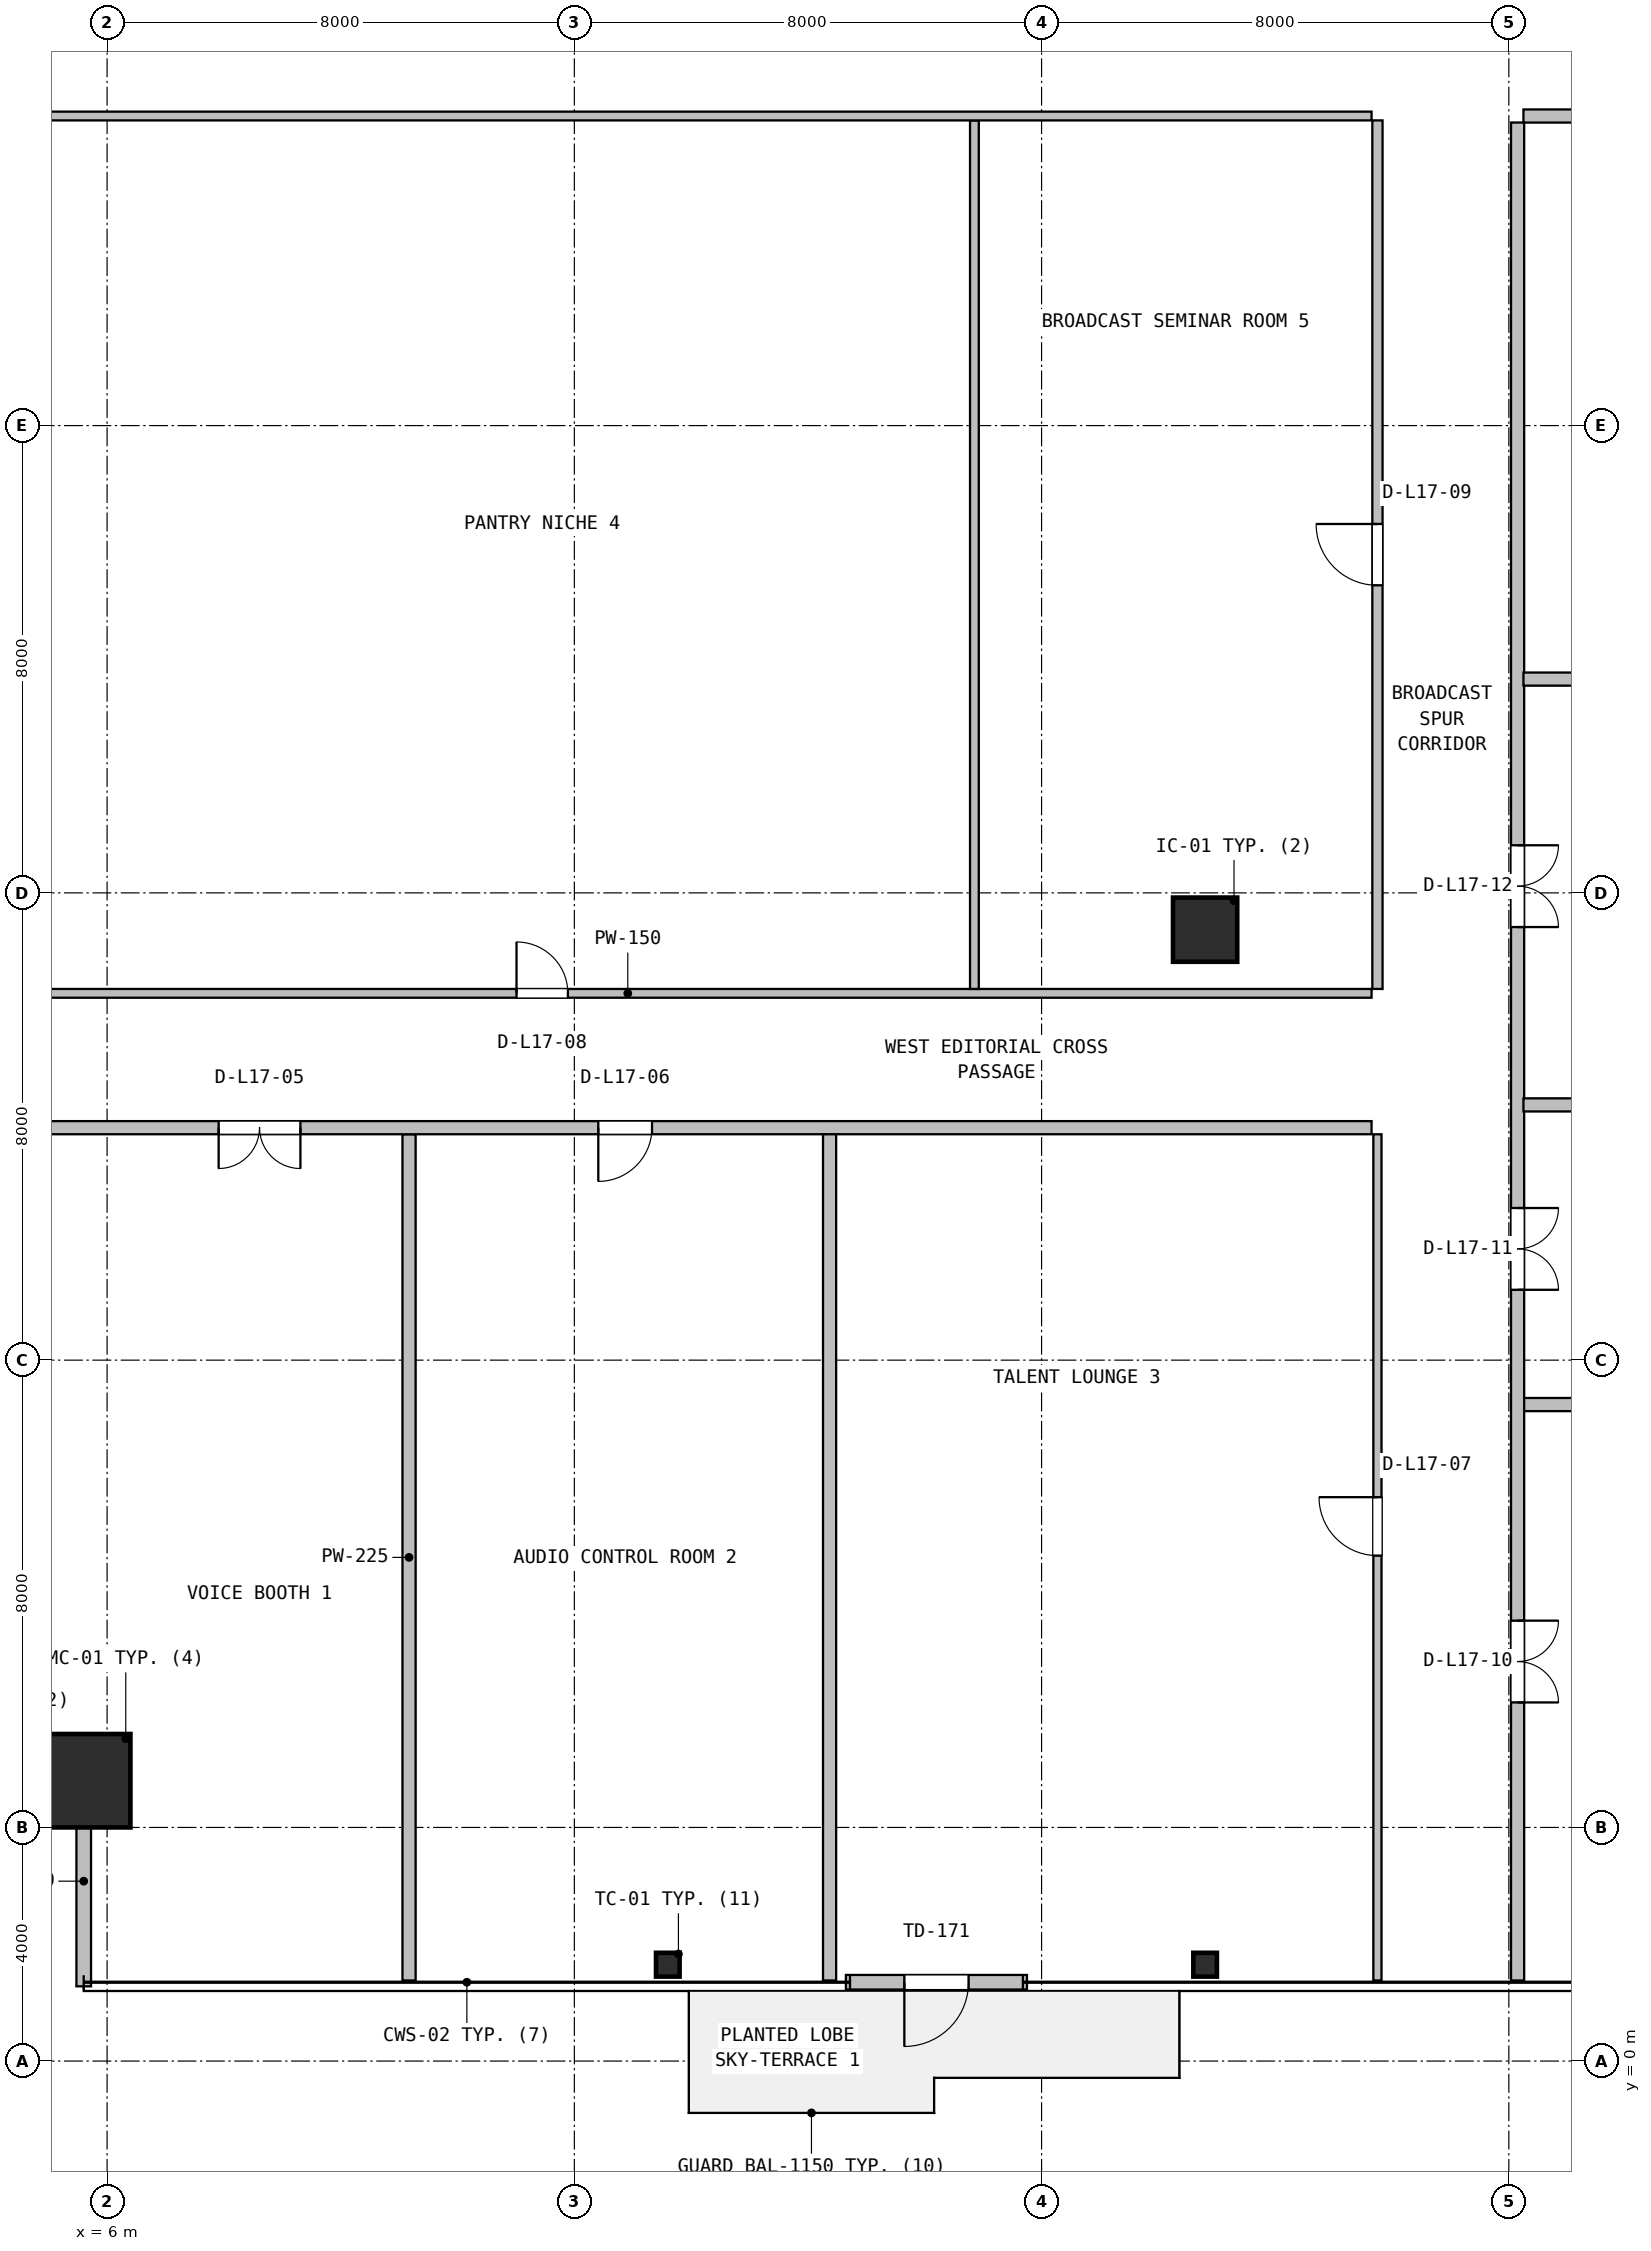
"""IFC4 building model, lengths in metres.
Left out: names, types, materials, properties, quantities, classifications, styles, units other than length and angle.
Written with IfcOpenShell. Run it as: python <this file> out.ifc"""

import sys

from ifc_helpers import new_model, si_unit, direction, frame, frame_2d, origin, origin_2d, place, context, subcontext, project, spatial, rectangle, hollow_rectangle, i_section, extrude, source, transform, mapped, element, fill, save


model = new_model("IFC4")
c1 = context("Model", 3, precision=1e-05, world=origin(), true_north=direction((0.0, 1.0)))
c2 = subcontext(c1, "Body", "Model", "MODEL_VIEW")
j1 = project(units=[si_unit("LENGTHUNIT", "METRE"), si_unit("PLANEANGLEUNIT", "RADIAN")], contexts=[c1])
p1 = place(None, origin())
s1 = spatial("IfcSite", under=j1, at=p1, CompositionType="ELEMENT")
p2 = place(p1, origin())
s2 = spatial("IfcBuilding", under=s1, at=p2, CompositionType="ELEMENT")
p3 = place(p2, frame((0.0, 0.0, 74.4)))
s3 = spatial("IfcBuildingStorey", under=s2, at=p3, CompositionType="ELEMENT", Elevation=74.4)
m1 = source(origin(), c2, "Body", "SweptSolid", [
    extrude(hollow_rectangle(XDim=1.6, YDim=1.6, WallThickness=0.06, at=origin_2d()), origin(), (0.0, 0.0, 1.0), 3.9),
])
p4 = place(p3, frame((5.6, 4.8, 0.0), z_axis=(0.0, 0.0, 1.0), x_axis=(1.0, 0.0, 0.0)))
e1 = element("IfcColumn", 1, at=p4, inside=s3, PredefinedType="COLUMN", context=c2, shape_type="MappedRepresentation", body=[
    mapped(m1, transform((0.0, 0.0, 0.0), x_axis=(1.0, 0.0, 0.0), y_axis=(0.0, 1.0, 0.0), z_axis=(0.0, 0.0, 1.0), scale=1.0)),
])
m2 = source(origin(), c2, "Body", "SweptSolid", [
    extrude(i_section(OverallWidth=0.404, OverallDepth=0.407, WebThickness=0.027, FlangeThickness=0.044, FilletRadius=0.018, at=origin_2d()), origin(), (0.0, 0.0, 1.0), 3.9),
])
for number, where, z_axis, x_axis in (
    (2, (15.6, 1.65, 0.0), (0.0, 0.0, 1.0), (1.0, 0.0, 0.0)),
    (3, (24.8, 1.65, 0.0), (0.0, 0.0, 1.0), (1.0, 0.0, 0.0)),
):
    element("IfcColumn", number, at=place(p3, frame(where, z_axis=z_axis, x_axis=x_axis)), inside=s3, PredefinedType="COLUMN", context=c2, shape_type="MappedRepresentation", body=[
        mapped(m2, transform((0.0, 0.0, 0.0), x_axis=(1.0, 0.0, 0.0), y_axis=(0.0, 1.0, 0.0), z_axis=(0.0, 0.0, 1.0), scale=1.0)),
    ])
m3 = source(origin(), c2, "Body", "SweptSolid", [
    extrude(rectangle(XDim=1.1, YDim=1.1, at=origin_2d()), origin(), (0.0, 0.0, 1.0), 3.9),
])
p5 = place(p3, frame((24.8, 19.37, 0.0), z_axis=(0.0, 0.0, 1.0), x_axis=(1.0, 0.0, 0.0)))
e4 = element("IfcColumn", 4, at=p5, inside=s3, PredefinedType="COLUMN", context=c2, shape_type="MappedRepresentation", body=[
    mapped(m3, transform((0.0, 0.0, 0.0), x_axis=(1.0, 0.0, 0.0), y_axis=(0.0, 1.0, 0.0), z_axis=(0.0, 0.0, 1.0), scale=1.0)),
])
p6 = place(p3, frame((18.65, 1.35, 0.0), z_axis=(0.0, 0.0, 1.0), x_axis=(1.0, 0.0, 0.0)))
e5 = element("IfcWall", 5, at=p6, inside=s3, PredefinedType="SOLIDWALL", context=c2, shape_type="SweptSolid", body=[
    extrude(rectangle(XDim=3.1, YDim=0.25, at=frame_2d((1.55, 0.0))), origin(), (0.0, 0.0, 1.0), 3.63),
])
p7 = place(p6, frame((1.0, 0.0, 0.0)))
e6 = element("IfcOpeningElement", 6, at=p7, cuts=e5, PredefinedType="OPENING", context=c2, shape_type="SweptSolid", body=[
    extrude(rectangle(XDim=1.1, YDim=2.15, at=frame_2d((0.55, 1.075))), frame((0.0, 0.135, 0.0), z_axis=(0.0, -1.0, 0.0), x_axis=(1.0, 0.0, 0.0)), (0.0, 0.0, 1.0), 0.27),
])
p8 = place(p3, frame((5.6, 1.28, 0.0), z_axis=(0.0, 0.0, 1.0), x_axis=(0.0, 1.0, 0.0)))
e7 = element("IfcWall", 7, at=p8, inside=s3, PredefinedType="SOLIDWALL", context=c2, shape_type="SweptSolid", body=[
    extrude(rectangle(XDim=3.6, YDim=0.25, at=frame_2d((1.8, 0.0))), origin(), (0.0, 0.0, 1.0), 3.208),
])
p9 = place(p3, frame((11.17, 1.38, 0.0), z_axis=(0.0, 0.0, 1.0), x_axis=(0.0, 1.0, 0.0)))
e8 = element("IfcWall", 8, at=p9, inside=s3, PredefinedType="PARTITIONING", context=c2, shape_type="SweptSolid", body=[
    extrude(rectangle(XDim=14.487, YDim=0.225, at=frame_2d((7.244, 0.0))), origin(), (0.0, 0.0, 1.0), 3.208),
])
p10 = place(p3, frame((2.18, 15.98, 0.0), z_axis=(0.0, 0.0, 1.0), x_axis=(1.0, 0.0, 0.0)))
e9 = element("IfcWall", 9, at=p10, inside=s3, PredefinedType="PARTITIONING", context=c2, shape_type="SweptSolid", body=[
    extrude(rectangle(XDim=25.47, YDim=0.225, at=frame_2d((12.735, 0.0))), origin(), (0.0, 0.0, 1.0), 2.852),
])
p11 = place(p10, frame((5.73, 0.0, 0.0)))
e10 = element("IfcOpeningElement", 10, at=p11, cuts=e9, PredefinedType="OPENING", context=c2, shape_type="SweptSolid", body=[
    extrude(rectangle(XDim=1.4, YDim=2.12, at=frame_2d((0.7, 1.06))), frame((0.0, 0.123, 0.0), z_axis=(0.0, -1.0, 0.0), x_axis=(1.0, 0.0, 0.0)), (0.0, 0.0, 1.0), 0.245),
])
p12 = place(p10, frame((12.23, 0.0, 0.0)))
e11 = element("IfcOpeningElement", 11, at=p12, cuts=e9, PredefinedType="OPENING", context=c2, shape_type="SweptSolid", body=[
    extrude(rectangle(XDim=0.92, YDim=2.08, at=frame_2d((0.46, 1.04))), frame((0.0, 0.123, 0.0), z_axis=(0.0, -1.0, 0.0), x_axis=(1.0, 0.0, 0.0)), (0.0, 0.0, 1.0), 0.245),
])
p13 = place(p3, frame((18.37, 1.38, 0.0), z_axis=(0.0, 0.0, 1.0), x_axis=(0.0, 1.0, 0.0)))
e12 = element("IfcWall", 12, at=p13, inside=s3, PredefinedType="PARTITIONING", context=c2, shape_type="SweptSolid", body=[
    extrude(rectangle(XDim=14.487, YDim=0.225, at=frame_2d((7.244, 0.0))), origin(), (0.0, 0.0, 1.0), 3.208),
])
p14 = place(p3, frame((27.75, 1.38, 0.0), z_axis=(0.0, 0.0, 1.0), x_axis=(0.0, 1.0, 0.0)))
e13 = element("IfcWall", 13, at=p14, inside=s3, PredefinedType="PARTITIONING", context=c2, shape_type="SweptSolid", body=[
    extrude(rectangle(XDim=14.487, YDim=0.14, at=frame_2d((7.244, 0.0))), origin(), (0.0, 0.0, 1.0), 3.208),
])
p15 = place(p14, frame((7.274, 0.0, 0.0)))
e14 = element("IfcOpeningElement", 14, at=p15, cuts=e13, PredefinedType="OPENING", context=c2, shape_type="SweptSolid", body=[
    extrude(rectangle(XDim=1.0, YDim=2.1, at=frame_2d((0.5, 1.05))), frame((0.0, 0.08, 0.0), z_axis=(0.0, -1.0, 0.0), x_axis=(1.0, 0.0, 0.0)), (0.0, 0.0, 1.0), 0.16),
])
p16 = place(p3, frame((2.18, 18.28, 0.0), z_axis=(0.0, 0.0, 1.0), x_axis=(1.0, 0.0, 0.0)))
e15 = element("IfcWall", 15, at=p16, inside=s3, PredefinedType="PARTITIONING", context=c2, shape_type="SweptSolid", body=[
    extrude(rectangle(XDim=25.47, YDim=0.15, at=frame_2d((12.735, 0.0))), origin(), (0.0, 0.0, 1.0), 2.852),
])
p17 = place(p16, frame((10.83, 0.0, 0.0)))
e16 = element("IfcOpeningElement", 16, at=p17, cuts=e15, PredefinedType="OPENING", context=c2, shape_type="SweptSolid", body=[
    extrude(rectangle(XDim=0.88, YDim=2.06, at=frame_2d((0.44, 1.03))), frame((0.0, 0.085, 0.0), z_axis=(0.0, -1.0, 0.0), x_axis=(1.0, 0.0, 0.0)), (0.0, 0.0, 1.0), 0.17),
])
p18 = place(p3, frame((20.85, 18.355, 0.0), z_axis=(0.0, 0.0, 1.0), x_axis=(0.0, 1.0, 0.0)))
e17 = element("IfcWall", 17, at=p18, inside=s3, PredefinedType="PARTITIONING", context=c2, shape_type="SweptSolid", body=[
    extrude(rectangle(XDim=14.87, YDim=0.15, at=frame_2d((7.435, 0.0))), origin(), (0.0, 0.0, 1.0), 3.322),
])
p19 = place(p3, frame((2.18, 33.3, 0.0), z_axis=(0.0, 0.0, 1.0), x_axis=(1.0, 0.0, 0.0)))
e18 = element("IfcWall", 18, at=p19, inside=s3, PredefinedType="PARTITIONING", context=c2, shape_type="SweptSolid", body=[
    extrude(rectangle(XDim=25.47, YDim=0.15, at=frame_2d((12.735, 0.0))), origin(), (0.0, 0.0, 1.0), 2.852),
])
p20 = place(p3, frame((27.75, 18.355, 0.0), z_axis=(0.0, 0.0, 1.0), x_axis=(0.0, 1.0, 0.0)))
e19 = element("IfcWall", 19, at=p20, inside=s3, PredefinedType="PARTITIONING", context=c2, shape_type="SweptSolid", body=[
    extrude(rectangle(XDim=14.87, YDim=0.175, at=frame_2d((7.435, 0.0))), origin(), (0.0, 0.0, 1.0), 2.852),
])
p21 = place(p20, frame((6.91, 0.0, 0.0)))
e20 = element("IfcOpeningElement", 20, at=p21, cuts=e19, PredefinedType="OPENING", context=c2, shape_type="SweptSolid", body=[
    extrude(rectangle(XDim=1.05, YDim=2.1, at=frame_2d((0.525, 1.05))), frame((0.0, 0.098, 0.0), z_axis=(0.0, -1.0, 0.0), x_axis=(1.0, 0.0, 0.0)), (0.0, 0.0, 1.0), 0.195),
])
p22 = place(p3, frame((30.25, 11.24, 0.0), z_axis=(0.0, 0.0, 1.0), x_axis=(1.0, 0.0, 0.0)))
e21 = element("IfcWall", 21, at=p22, inside=s3, PredefinedType="PARTITIONING", context=c2, shape_type="SweptSolid", body=[
    extrude(rectangle(XDim=35.57, YDim=0.225, at=frame_2d((17.785, 0.0))), origin(), (0.0, 0.0, 1.0), 2.852),
])
p23 = place(p3, frame((30.15, 1.38, 0.0), z_axis=(0.0, 0.0, 1.0), x_axis=(0.0, 1.0, 0.0)))
e22 = element("IfcWall", 22, at=p23, inside=s3, PredefinedType="PARTITIONING", context=c2, shape_type="SweptSolid", body=[
    extrude(rectangle(XDim=31.808, YDim=0.225, at=frame_2d((15.904, 0.0))), origin(), (0.0, 0.0, 1.0), 2.852),
])
p24 = place(p23, frame((4.76, 0.0, 0.0)))
e23 = element("IfcOpeningElement", 23, at=p24, cuts=e22, PredefinedType="OPENING", context=c2, shape_type="SweptSolid", body=[
    extrude(rectangle(XDim=1.4, YDim=2.12, at=frame_2d((0.7, 1.06))), frame((0.0, 0.123, 0.0), z_axis=(0.0, -1.0, 0.0), x_axis=(1.0, 0.0, 0.0)), (0.0, 0.0, 1.0), 0.245),
])
p25 = place(p23, frame((11.825, 0.0, 0.0)))
e24 = element("IfcOpeningElement", 24, at=p25, cuts=e22, PredefinedType="OPENING", context=c2, shape_type="SweptSolid", body=[
    extrude(rectangle(XDim=1.4, YDim=2.12, at=frame_2d((0.7, 1.06))), frame((0.0, 0.123, 0.0), z_axis=(0.0, -1.0, 0.0), x_axis=(1.0, 0.0, 0.0)), (0.0, 0.0, 1.0), 0.245),
])
p26 = place(p23, frame((18.035, 0.0, 0.0)))
e25 = element("IfcOpeningElement", 25, at=p26, cuts=e22, PredefinedType="OPENING", context=c2, shape_type="SweptSolid", body=[
    extrude(rectangle(XDim=1.4, YDim=2.12, at=frame_2d((0.7, 1.06))), frame((0.0, 0.123, 0.0), z_axis=(0.0, -1.0, 0.0), x_axis=(1.0, 0.0, 0.0)), (0.0, 0.0, 1.0), 0.245),
])
for number, where, z_axis, x_axis in (
    (26, (30.25, 16.37, 0.0), (0.0, 0.0, 1.0), (1.0, 0.0, 0.0)),
    (27, (30.25, 23.66, 0.0), (0.0, 0.0, 1.0), (1.0, 0.0, 0.0)),
):
    element("IfcWall", number, at=place(p3, frame(where, z_axis=z_axis, x_axis=x_axis)), inside=s3, PredefinedType="PARTITIONING", context=c2, shape_type="SweptSolid", body=[
        extrude(rectangle(XDim=35.57, YDim=0.225, at=frame_2d((17.785, 0.0))), origin(), (0.0, 0.0, 1.0), 2.852),
    ])
p27 = place(p3, frame((30.25, 33.3, 0.0), z_axis=(0.0, 0.0, 1.0), x_axis=(1.0, 0.0, 0.0)))
e28 = element("IfcWall", 28, at=p27, inside=s3, PredefinedType="PARTITIONING", context=c2, shape_type="SweptSolid", body=[
    extrude(rectangle(XDim=35.57, YDim=0.225, at=frame_2d((17.785, 0.0))), origin(), (0.0, 0.0, 1.0), 2.852),
])
p28 = place(p27, frame((15.39, 0.0, 0.0)))
e29 = element("IfcOpeningElement", 29, at=p28, cuts=e28, PredefinedType="OPENING", context=c2, shape_type="SweptSolid", body=[
    extrude(rectangle(XDim=0.92, YDim=2.08, at=frame_2d((0.46, 1.04))), frame((0.0, 0.123, 0.0), z_axis=(0.0, -1.0, 0.0), x_axis=(1.0, 0.0, 0.0)), (0.0, 0.0, 1.0), 0.245),
])
m4 = source(origin(), c2, "Body", "SweptSolid", [
    extrude(rectangle(XDim=1.1, YDim=2.15, at=frame_2d((0.55, 1.075))), frame((0.0, 0.025, 0.0), z_axis=(0.0, -1.0, 0.0), x_axis=(1.0, 0.0, 0.0)), (0.0, 0.0, 1.0), 0.05),
])
p29 = place(p7, frame((1.1, 0.0, 0.0), z_axis=(0.0, 0.0, 1.0), x_axis=(-1.0, 0.0, 0.0)))
e30 = element("IfcDoor", 30, at=p29, inside=s3, OperationType="SINGLE_SWING_LEFT", PredefinedType="DOOR", context=c2, shape_type="MappedRepresentation", body=[
    mapped(m4, transform((0.0, 0.0, 0.0), x_axis=(1.0, 0.0, 0.0), y_axis=(0.0, 1.0, 0.0), z_axis=(0.0, 0.0, 1.0), scale=1.0)),
])
fill(e6, e30)
m5 = source(origin(), c2, "Body", "SweptSolid", [
    extrude(rectangle(XDim=1.4, YDim=2.12, at=frame_2d((0.7, 1.06))), frame((0.0, 0.025, 0.0), z_axis=(0.0, -1.0, 0.0), x_axis=(1.0, 0.0, 0.0)), (0.0, 0.0, 1.0), 0.05),
])
p30 = place(p11, frame((1.4, 0.0, 0.0), z_axis=(0.0, 0.0, 1.0), x_axis=(-1.0, 0.0, 0.0)))
e31 = element("IfcDoor", 31, at=p30, inside=s3, OperationType="DOUBLE_DOOR_SINGLE_SWING", PredefinedType="DOOR", context=c2, shape_type="MappedRepresentation", body=[
    mapped(m5, transform((0.0, 0.0, 0.0), x_axis=(1.0, 0.0, 0.0), y_axis=(0.0, 1.0, 0.0), z_axis=(0.0, 0.0, 1.0), scale=1.0)),
])
fill(e10, e31)
m6 = source(origin(), c2, "Body", "SweptSolid", [
    extrude(rectangle(XDim=0.92, YDim=2.08, at=frame_2d((0.46, 1.04))), frame((0.0, 0.025, 0.0), z_axis=(0.0, -1.0, 0.0), x_axis=(1.0, 0.0, 0.0)), (0.0, 0.0, 1.0), 0.05),
])
p31 = place(p12, frame((0.92, 0.0, 0.0), z_axis=(0.0, 0.0, 1.0), x_axis=(-1.0, 0.0, 0.0)))
e32 = element("IfcDoor", 32, at=p31, inside=s3, OperationType="SINGLE_SWING_LEFT", PredefinedType="DOOR", context=c2, shape_type="MappedRepresentation", body=[
    mapped(m6, transform((0.0, 0.0, 0.0), x_axis=(1.0, 0.0, 0.0), y_axis=(0.0, 1.0, 0.0), z_axis=(0.0, 0.0, 1.0), scale=1.0)),
])
fill(e11, e32)
m7 = source(origin(), c2, "Body", "SweptSolid", [
    extrude(rectangle(XDim=1.0, YDim=2.1, at=frame_2d((0.5, 1.05))), frame((0.0, 0.025, 0.0), z_axis=(0.0, -1.0, 0.0), x_axis=(1.0, 0.0, 0.0)), (0.0, 0.0, 1.0), 0.05),
])
p32 = place(p15, origin())
e33 = element("IfcDoor", 33, at=p32, inside=s3, OperationType="SINGLE_SWING_RIGHT", PredefinedType="DOOR", context=c2, shape_type="MappedRepresentation", body=[
    mapped(m7, transform((0.0, 0.0, 0.0), x_axis=(1.0, 0.0, 0.0), y_axis=(0.0, 1.0, 0.0), z_axis=(0.0, 0.0, 1.0), scale=1.0)),
])
fill(e14, e33)
m8 = source(origin(), c2, "Body", "SweptSolid", [
    extrude(rectangle(XDim=0.88, YDim=2.06, at=frame_2d((0.44, 1.03))), frame((0.0, 0.025, 0.0), z_axis=(0.0, -1.0, 0.0), x_axis=(1.0, 0.0, 0.0)), (0.0, 0.0, 1.0), 0.05),
])
p33 = place(p17, origin())
e34 = element("IfcDoor", 34, at=p33, inside=s3, OperationType="SINGLE_SWING_LEFT", PredefinedType="DOOR", context=c2, shape_type="MappedRepresentation", body=[
    mapped(m8, transform((0.0, 0.0, 0.0), x_axis=(1.0, 0.0, 0.0), y_axis=(0.0, 1.0, 0.0), z_axis=(0.0, 0.0, 1.0), scale=1.0)),
])
fill(e16, e34)
m9 = source(origin(), c2, "Body", "SweptSolid", [
    extrude(rectangle(XDim=1.05, YDim=2.1, at=frame_2d((0.525, 1.05))), frame((0.0, 0.025, 0.0), z_axis=(0.0, -1.0, 0.0), x_axis=(1.0, 0.0, 0.0)), (0.0, 0.0, 1.0), 0.05),
])
p34 = place(p21, origin())
e35 = element("IfcDoor", 35, at=p34, inside=s3, OperationType="SINGLE_SWING_RIGHT", PredefinedType="DOOR", context=c2, shape_type="MappedRepresentation", body=[
    mapped(m9, transform((0.0, 0.0, 0.0), x_axis=(1.0, 0.0, 0.0), y_axis=(0.0, 1.0, 0.0), z_axis=(0.0, 0.0, 1.0), scale=1.0)),
])
fill(e20, e35)
p35 = place(p24, frame((1.4, 0.0, 0.0), z_axis=(0.0, 0.0, 1.0), x_axis=(-1.0, 0.0, 0.0)))
e36 = element("IfcDoor", 36, at=p35, inside=s3, OperationType="DOUBLE_DOOR_SINGLE_SWING", PredefinedType="DOOR", context=c2, shape_type="MappedRepresentation", body=[
    mapped(m5, transform((0.0, 0.0, 0.0), x_axis=(1.0, 0.0, 0.0), y_axis=(0.0, 1.0, 0.0), z_axis=(0.0, 0.0, 1.0), scale=1.0)),
])
fill(e23, e36)
p36 = place(p25, frame((1.4, 0.0, 0.0), z_axis=(0.0, 0.0, 1.0), x_axis=(-1.0, 0.0, 0.0)))
e37 = element("IfcDoor", 37, at=p36, inside=s3, OperationType="DOUBLE_DOOR_SINGLE_SWING", PredefinedType="DOOR", context=c2, shape_type="MappedRepresentation", body=[
    mapped(m5, transform((0.0, 0.0, 0.0), x_axis=(1.0, 0.0, 0.0), y_axis=(0.0, 1.0, 0.0), z_axis=(0.0, 0.0, 1.0), scale=1.0)),
])
fill(e24, e37)
p37 = place(p26, frame((1.4, 0.0, 0.0), z_axis=(0.0, 0.0, 1.0), x_axis=(-1.0, 0.0, 0.0)))
e38 = element("IfcDoor", 38, at=p37, inside=s3, OperationType="DOUBLE_DOOR_SINGLE_SWING", PredefinedType="DOOR", context=c2, shape_type="MappedRepresentation", body=[
    mapped(m5, transform((0.0, 0.0, 0.0), x_axis=(1.0, 0.0, 0.0), y_axis=(0.0, 1.0, 0.0), z_axis=(0.0, 0.0, 1.0), scale=1.0)),
])
fill(e25, e38)
save(model, sys.argv[1])
